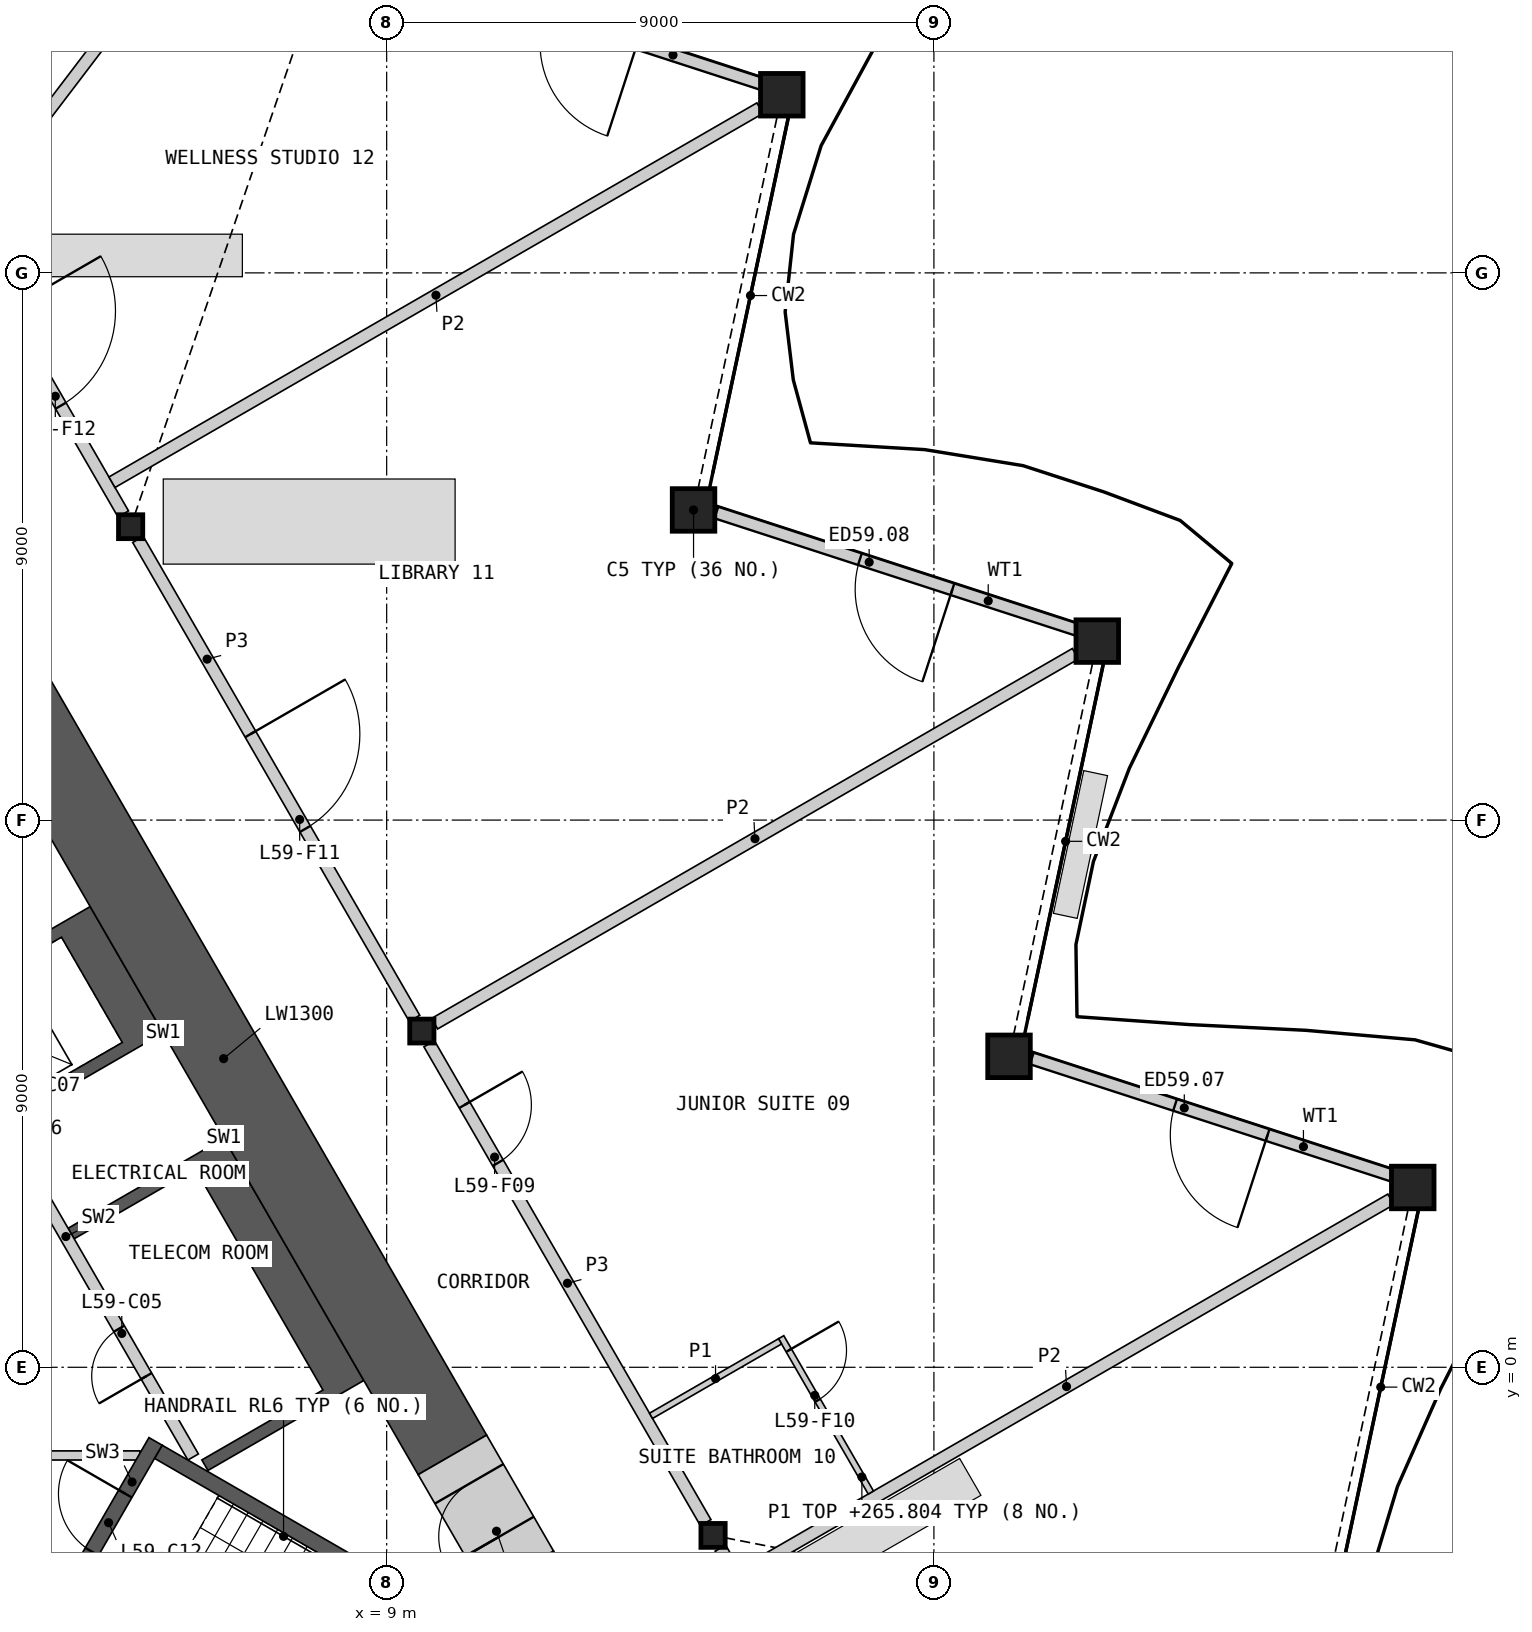
"""IFC4 building model, lengths in metres.
Left out: names, types, materials, properties, quantities, classifications, styles, units other than length and angle.
Written with IfcOpenShell. Run it as: python <this file> out.ifc"""

import sys

from ifc_helpers import new_model, si_unit, direction, frame, frame_2d, origin, origin_2d, place, context, subcontext, project, spatial, polyline, rectangle, hollow_rectangle, i_section, outline, extrude, element, fill, save


model = new_model("IFC4")
c1 = context("Model", 3, precision=1e-05, world=origin(), true_north=direction((0.0, 1.0)))
c2 = subcontext(c1, "Body", "Model", "MODEL_VIEW")
j1 = project(units=[si_unit("LENGTHUNIT", "METRE"), si_unit("PLANEANGLEUNIT", "RADIAN")], contexts=[c1])
p1 = place(None, origin())
s1 = spatial("IfcSite", under=j1, at=p1, CompositionType="ELEMENT")
p2 = place(p1, origin())
s2 = spatial("IfcBuilding", under=s1, at=p2, CompositionType="ELEMENT")
p3 = place(p2, frame((0.0, 0.0, 263.4)))
s3 = spatial("IfcBuildingStorey", under=s2, at=p3, CompositionType="ELEMENT", Elevation=263.4)
for number, where, z_axis, x_axis in (
    (1, (25.875, 2.957, 0.0), (0.0, 0.0, 1.0), (1.0, 0.0, 0.0)),
    (2, (19.235, 5.115, 0.0), (0.0, 0.0, 1.0), (1.0, 0.0, 0.0)),
    (3, (20.687, 11.943, 0.0), (0.0, 0.0, 1.0), (1.0, 0.0, 0.0)),
    (4, (14.047, 14.101, 0.0), (0.0, 0.0, 1.0), (1.0, 0.0, 0.0)),
    (5, (15.499, 20.93, 0.0), (0.0, 0.0, 1.0), (1.0, 0.0, 0.0)),
):
    element("IfcColumn", number, at=place(p3, frame(where, z_axis=z_axis, x_axis=x_axis)), inside=s3, PredefinedType="COLUMN", context=c2, shape_type="SweptSolid", body=[
        extrude(hollow_rectangle(XDim=0.7, YDim=0.7, WallThickness=0.045, at=origin_2d()), origin(), (0.0, 0.0, 1.0), 3.6),
    ])
for number, where, z_axis, x_axis in (
    (6, (14.368, -2.765, 0.0), (0.0, 0.0, 1.0), (1.0, 0.0, 0.0)),
    (7, (9.578, 5.53, 0.0), (0.0, 0.0, 1.0), (1.0, 0.0, 0.0)),
    (8, (4.789, 13.825, 0.0), (0.0, 0.0, 1.0), (1.0, 0.0, 0.0)),
):
    element("IfcColumn", number, at=place(p3, frame(where, z_axis=z_axis, x_axis=x_axis)), inside=s3, PredefinedType="COLUMN", context=c2, shape_type="SweptSolid", body=[
        extrude(i_section(OverallWidth=0.399, OverallDepth=0.393, WebThickness=0.023, FlangeThickness=0.037, at=origin_2d()), origin(), (0.0, 0.0, 1.0), 3.6),
    ])
p4 = place(p3, frame((25.566, 3.145, 0.0), z_axis=(0.0, 0.0, 1.0), x_axis=(-0.951057270474, 0.309014673241, 0.0)))
e9 = element("IfcWall", 9, at=p4, inside=s3, PredefinedType="SOLIDWALL", context=c2, shape_type="SweptSolid", body=[
    extrude(rectangle(XDim=6.263, YDim=0.2, at=frame_2d((3.131, 0.0))), origin(), (0.0, 0.0, 1.0), 2.701),
])
p5 = place(p4, frame((2.186, 0.0, 0.0)))
e10 = element("IfcOpeningElement", 10, at=p5, cuts=e9, PredefinedType="OPENING", context=c2, shape_type="SweptSolid", body=[
    extrude(rectangle(XDim=1.6, YDim=2.4, at=frame_2d((0.8, 1.2))), frame((0.0, 0.11, 0.0), z_axis=(0.0, -1.0, 0.0), x_axis=(1.0, 0.0, 0.0)), (0.0, 0.0, 1.0), 0.22),
])
p6 = place(p3, frame((20.384, 12.121, 0.0), z_axis=(0.0, 0.0, 1.0), x_axis=(-0.951051239427, 0.309033234433, 0.0)))
e11 = element("IfcWall", 11, at=p6, inside=s3, PredefinedType="SOLIDWALL", context=c2, shape_type="SweptSolid", body=[
    extrude(rectangle(XDim=6.269, YDim=0.2, at=frame_2d((3.134, 0.0))), origin(), (0.0, 0.0, 1.0), 2.701),
])
p7 = place(p6, frame((2.186, 0.0, 0.0)))
e12 = element("IfcOpeningElement", 12, at=p7, cuts=e11, PredefinedType="OPENING", context=c2, shape_type="SweptSolid", body=[
    extrude(rectangle(XDim=1.6, YDim=2.4, at=frame_2d((0.8, 1.2))), frame((0.0, 0.11, 0.0), z_axis=(0.0, -1.0, 0.0), x_axis=(1.0, 0.0, 0.0)), (0.0, 0.0, 1.0), 0.22),
])
p8 = place(p3, frame((15.201, 21.098, 0.0), z_axis=(0.0, 0.0, 1.0), x_axis=(-0.95105665506, 0.309016567299, 0.0)))
e13 = element("IfcWall", 13, at=p8, inside=s3, PredefinedType="SOLIDWALL", context=c2, shape_type="SweptSolid", body=[
    extrude(rectangle(XDim=6.275, YDim=0.2, at=frame_2d((3.137, 0.0))), origin(), (0.0, 0.0, 1.0), 2.701),
])
p9 = place(p8, frame((2.186, 0.0, 0.0)))
e14 = element("IfcOpeningElement", 14, at=p9, cuts=e13, PredefinedType="OPENING", context=c2, shape_type="SweptSolid", body=[
    extrude(rectangle(XDim=1.6, YDim=2.4, at=frame_2d((0.8, 1.2))), frame((0.0, 0.11, 0.0), z_axis=(0.0, -1.0, 0.0), x_axis=(1.0, 0.0, 0.0)), (0.0, 0.0, 1.0), 0.22),
])
p10 = place(p3, origin())
e15 = element("IfcWall", 15, at=p10, inside=s3, PredefinedType="SHEAR", context=c2, shape_type="SweptSolid", body=[
    extrude(outline(polyline([(6.324, 3.767), (8.624, -0.217), (8.231, -0.444), (6.061, -1.697), (5.96, -1.524), (7.952, -0.374), (5.852, 3.263), (3.861, 2.113), (3.76, 2.287), (5.931, 3.54), (6.324, 3.767)])), origin(), (0.0, 0.0, 1.0), 3.25),
])
p11 = place(p3, origin())
e16 = element("IfcWall", 16, at=p11, inside=s3, PredefinedType="SHEAR", context=c2, shape_type="SweptSolid", body=[
    extrude(outline(polyline([(5.324, 5.499), (4.931, 5.272), (2.76, 4.019), (2.66, 4.192), (4.652, 5.342), (3.652, 7.074), (1.66, 5.924), (1.561, 6.097), (3.731, 7.35), (4.124, 7.577), (5.324, 5.499)])), origin(), (0.0, 0.0, 1.0), 3.25),
])
p12 = place(p3, frame((5.817, -1.476, 0.0), z_axis=(0.0, 0.0, 1.0), x_axis=(-0.500002616675, 0.866023893041, 0.0)))
e17 = element("IfcWall", 17, at=p12, inside=s3, PredefinedType="SOLIDWALL", context=c2, shape_type="SweptSolid", body=[
    extrude(rectangle(XDim=8.373, YDim=0.2, at=frame_2d((4.187, 0.0))), origin(), (0.0, 0.0, 1.0), 3.25),
])
p13 = place(p12, frame((1.537, 0.0, 0.0)))
e18 = element("IfcOpeningElement", 18, at=p13, cuts=e17, PredefinedType="OPENING", context=c2, shape_type="SweptSolid", body=[
    extrude(rectangle(XDim=0.9, YDim=2.1, at=frame_2d((0.45, 1.05))), frame((0.0, 0.11, 0.0), z_axis=(0.0, -1.0, 0.0), x_axis=(1.0, 0.0, 0.0)), (0.0, 0.0, 1.0), 0.22),
])
p14 = place(p12, frame((4.837, 0.0, 0.0)))
e19 = element("IfcOpeningElement", 19, at=p14, cuts=e17, PredefinedType="OPENING", context=c2, shape_type="SweptSolid", body=[
    extrude(rectangle(XDim=0.9, YDim=2.1, at=frame_2d((0.45, 1.05))), frame((0.0, 0.11, 0.0), z_axis=(0.0, -1.0, 0.0), x_axis=(1.0, 0.0, 0.0)), (0.0, 0.0, 1.0), 0.22),
])
p15 = place(p12, frame((6.937, 0.0, 0.0)))
e20 = element("IfcOpeningElement", 20, at=p15, cuts=e17, PredefinedType="OPENING", context=c2, shape_type="SweptSolid", body=[
    extrude(rectangle(XDim=1.1, YDim=2.1, at=frame_2d((0.55, 1.05))), frame((0.0, 0.11, 0.0), z_axis=(0.0, -1.0, 0.0), x_axis=(1.0, 0.0, 0.0)), (0.0, 0.0, 1.0), 0.22),
])
p16 = place(p3, frame((-4.941, -1.45, 0.0), z_axis=(0.0, 0.0, 1.0), x_axis=(1.0, 0.0, 0.0)))
e21 = element("IfcWall", 21, at=p16, inside=s3, PredefinedType="PARTITIONING", context=c2, shape_type="SweptSolid", body=[
    extrude(rectangle(XDim=9.882, YDim=0.15, at=frame_2d((4.941, 0.0))), origin(), (0.0, 0.0, 1.0), 3.25),
])
p17 = place(p16, frame((4.391, 0.0, 0.0)))
e22 = element("IfcOpeningElement", 22, at=p17, cuts=e21, PredefinedType="OPENING", context=c2, shape_type="SweptSolid", body=[
    extrude(rectangle(XDim=1.1, YDim=2.1, at=frame_2d((0.55, 1.05))), frame((0.0, 0.085, 0.0), z_axis=(0.0, -1.0, 0.0), x_axis=(1.0, 0.0, 0.0)), (0.0, 0.0, 1.0), 0.17),
])
p18 = place(p3, origin())
e23 = element("IfcWall", 23, at=p18, inside=s3, PredefinedType="SHEAR", context=c2, shape_type="SweptSolid", body=[
    extrude(outline(polyline([(10.032, -4.298), (10.374, -4.206), (5.307, -1.281), (5.182, -1.498), (10.032, -4.298)])), origin(), (0.0, 0.0, 1.0), 3.25),
])
p19 = place(p3, frame((3.655, -3.893, 0.0), z_axis=(0.0, 0.0, 1.0), x_axis=(0.499982516597, 0.866035497597, 0.0)))
e24 = element("IfcWall", 24, at=p19, inside=s3, PredefinedType="SHEAR", context=c2, shape_type="SweptSolid", body=[
    extrude(rectangle(XDim=3.088, YDim=0.25, at=frame_2d((1.544, 0.0))), origin(), (0.0, 0.0, 1.0), 3.25),
])
p20 = place(p19, frame((0.994, 0.0, 0.0)))
e25 = element("IfcOpeningElement", 25, at=p20, cuts=e24, PredefinedType="OPENING", context=c2, shape_type="SweptSolid", body=[
    extrude(rectangle(XDim=1.1, YDim=2.1, at=frame_2d((0.55, 1.05))), frame((0.0, 0.135, 0.0), z_axis=(0.0, -1.0, 0.0), x_axis=(1.0, 0.0, 0.0)), (0.0, 0.0, 1.0), 0.27),
])
p21 = place(p3, frame((10.081, -1.441, 0.0), z_axis=(0.0, 0.0, 1.0), x_axis=(-0.500012180433, 0.866018371294, 0.0)))
e26 = element("IfcWall", 26, at=p21, inside=s3, PredefinedType="SHEAR", context=c2, shape_type="SweptSolid", body=[
    extrude(rectangle(XDim=15.05, YDim=1.3, at=frame_2d((7.525, 0.0))), origin(), (0.0, 0.0, 1.0), 3.25),
])
p22 = place(p3, frame((13.311, -7.035, 0.0), z_axis=(0.0, 0.0, 1.0), x_axis=(-0.500003555838, 0.866023350811, 0.0)))
e27 = element("IfcWall", 27, at=p22, inside=s3, PredefinedType="SHEAR", context=c2, shape_type="SweptSolid", body=[
    extrude(rectangle(XDim=4.26, YDim=1.3, at=frame_2d((2.13, 0.0))), origin(), (0.0, 0.0, 1.0), 3.25),
])
p23 = place(p3, frame((11.181, -3.346, 0.0), z_axis=(0.0, 0.0, 1.0), x_axis=(-0.499946605688, 0.86605622881, 0.0)))
e28 = element("IfcWall", 28, at=p23, inside=s3, PredefinedType="SHEAR", context=c2, shape_type="SweptSolid", body=[
    extrude(rectangle(XDim=2.2, YDim=1.3, at=frame_2d((1.1, 0.0))), origin(), (0.0, 0.0, 1.0), 3.25),
])
p24 = place(p23, frame((0.65, 0.0, 0.0)))
e29 = element("IfcOpeningElement", 29, at=p24, cuts=e28, PredefinedType="OPENING", context=c2, shape_type="SweptSolid", body=[
    extrude(rectangle(XDim=1.0, YDim=2.1, at=frame_2d((0.5, 1.05))), frame((0.0, 0.66, 0.0), z_axis=(0.0, -1.0, 0.0), x_axis=(1.0, 0.0, 0.0)), (0.0, 0.0, 1.0), 1.32),
])
p25 = place(p3, frame((9.699, 5.321, 0.0), z_axis=(0.0, 0.0, 1.0), x_axis=(0.49998193945, -0.866035830797, 0.0)))
e30 = element("IfcWall", 30, at=p25, inside=s3, PredefinedType="PARTITIONING", context=c2, shape_type="SweptSolid", body=[
    extrude(rectangle(XDim=9.094, YDim=0.2, at=frame_2d((4.547, 0.0))), origin(), (0.0, 0.0, 1.0), 3.25),
])
p26 = place(p25, frame((1.162, 0.0, 0.0)))
e31 = element("IfcOpeningElement", 31, at=p26, cuts=e30, PredefinedType="OPENING", context=c2, shape_type="SweptSolid", body=[
    extrude(rectangle(XDim=1.1, YDim=2.1, at=frame_2d((0.55, 1.05))), frame((0.0, 0.11, 0.0), z_axis=(0.0, -1.0, 0.0), x_axis=(1.0, 0.0, 0.0)), (0.0, 0.0, 1.0), 0.22),
])
p27 = place(p3, frame((4.91, 13.616, 0.0), z_axis=(0.0, 0.0, 1.0), x_axis=(0.50000207303, -0.866024206917, 0.0)))
e32 = element("IfcWall", 32, at=p27, inside=s3, PredefinedType="PARTITIONING", context=c2, shape_type="SweptSolid", body=[
    extrude(rectangle(XDim=9.095, YDim=0.2, at=frame_2d((4.547, 0.0))), origin(), (0.0, 0.0, 1.0), 3.25),
])
p28 = place(p27, frame((3.698, 0.0, 0.0)))
e33 = element("IfcOpeningElement", 33, at=p28, cuts=e32, PredefinedType="OPENING", context=c2, shape_type="SweptSolid", body=[
    extrude(rectangle(XDim=1.8, YDim=2.1, at=frame_2d((0.9, 1.05))), frame((0.0, 0.11, 0.0), z_axis=(0.0, -1.0, 0.0), x_axis=(1.0, 0.0, 0.0)), (0.0, 0.0, 1.0), 0.22),
])
p29 = place(p3, frame((1.913, 18.807, 0.0), z_axis=(0.0, 0.0, 1.0), x_axis=(0.499984524817, -0.866034338201, 0.0)))
e34 = element("IfcWall", 34, at=p29, inside=s3, PredefinedType="PARTITIONING", context=c2, shape_type="SweptSolid", body=[
    extrude(rectangle(XDim=5.51, YDim=0.2, at=frame_2d((2.755, 0.0))), origin(), (0.0, 0.0, 1.0), 3.25),
])
p30 = place(p29, frame((1.655, 0.0, 0.0)))
e35 = element("IfcOpeningElement", 35, at=p30, cuts=e34, PredefinedType="OPENING", context=c2, shape_type="SweptSolid", body=[
    extrude(rectangle(XDim=1.8, YDim=2.1, at=frame_2d((0.9, 1.05))), frame((0.0, 0.11, 0.0), z_axis=(0.0, -1.0, 0.0), x_axis=(1.0, 0.0, 0.0)), (0.0, 0.0, 1.0), 0.22),
])
p31 = place(p3, frame((14.489, -2.975, 0.0), z_axis=(0.0, 0.0, 1.0), x_axis=(0.500017753321, -0.866015153657, 0.0)))
e36 = element("IfcWall", 36, at=p31, inside=s3, PredefinedType="PARTITIONING", context=c2, shape_type="SweptSolid", body=[
    extrude(rectangle(XDim=5.51, YDim=0.2, at=frame_2d((2.755, 0.0))), origin(), (0.0, 0.0, 1.0), 3.25),
])
p32 = place(p31, frame((2.056, 0.0, 0.0)))
e37 = element("IfcOpeningElement", 37, at=p32, cuts=e36, PredefinedType="OPENING", context=c2, shape_type="SweptSolid", body=[
    extrude(rectangle(XDim=1.8, YDim=2.1, at=frame_2d((0.9, 1.05))), frame((0.0, 0.11, 0.0), z_axis=(0.0, -1.0, 0.0), x_axis=(1.0, 0.0, 0.0)), (0.0, 0.0, 1.0), 0.22),
])
p33 = place(p3, frame((2.024, 18.8, 0.0), z_axis=(0.0, 0.0, 1.0), x_axis=(0.605225740135, 0.796053894832, 0.0)))
e38 = element("IfcWall", 38, at=p33, inside=s3, PredefinedType="PARTITIONING", context=c2, shape_type="SweptSolid", body=[
    extrude(rectangle(XDim=13.511, YDim=0.2, at=frame_2d((6.756, 0.0))), origin(), (0.0, 0.0, 1.0), 2.404),
])
p34 = place(p3, frame((14.848, -3.396, 0.0), z_axis=(0.0, 0.0, 1.0), x_axis=(0.866026822589, 0.49999754255, 0.0)))
e39 = element("IfcWall", 39, at=p34, inside=s3, PredefinedType="PARTITIONING", context=c2, shape_type="SweptSolid", body=[
    extrude(rectangle(XDim=12.317, YDim=0.2, at=frame_2d((6.159, 0.0))), origin(), (0.0, 0.0, 1.0), 2.404),
])
p35 = place(p3, frame((4.482, 14.557, 0.0), z_axis=(0.0, 0.0, 1.0), x_axis=(0.866030620616, 0.499990964073, 0.0)))
e40 = element("IfcWall", 40, at=p35, inside=s3, PredefinedType="PARTITIONING", context=c2, shape_type="SweptSolid", body=[
    extrude(rectangle(XDim=12.304, YDim=0.2, at=frame_2d((6.152, 0.0))), origin(), (0.0, 0.0, 1.0), 2.404),
])
p36 = place(p3, frame((9.788, 5.651, 0.0), z_axis=(0.0, 0.0, 1.0), x_axis=(0.866024549986, 0.50000147882, 0.0)))
e41 = element("IfcWall", 41, at=p36, inside=s3, PredefinedType="PARTITIONING", context=c2, shape_type="SweptSolid", body=[
    extrude(rectangle(XDim=12.169, YDim=0.2, at=frame_2d((6.084, 0.0))), origin(), (0.0, 0.0, 1.0), 2.404),
])
p37 = place(p3, frame((15.488, 0.495, 0.0), z_axis=(0.0, 0.0, 1.0), x_axis=(0.500037662692, -0.866003658127, 0.0)))
e42 = element("IfcWall", 42, at=p37, inside=s3, PredefinedType="PARTITIONING", context=c2, shape_type="SweptSolid", body=[
    extrude(rectangle(XDim=2.95, YDim=0.1, at=frame_2d((1.475, 0.0))), origin(), (0.0, 0.0, 1.0), 2.404),
])
p38 = place(p37, frame((0.25, 0.0, 0.0)))
e43 = element("IfcOpeningElement", 43, at=p38, cuts=e42, PredefinedType="OPENING", context=c2, shape_type="SweptSolid", body=[
    extrude(rectangle(XDim=0.95, YDim=2.1, at=frame_2d((0.475, 1.05))), frame((0.0, 0.06, 0.0), z_axis=(0.0, -1.0, 0.0), x_axis=(1.0, 0.0, 0.0)), (0.0, 0.0, 1.0), 0.12),
])
p39 = place(p3, frame((13.348, -0.799, 0.0), z_axis=(0.0, 0.0, 1.0), x_axis=(0.866014668023, 0.500018594424, 0.0)))
e44 = element("IfcWall", 44, at=p39, inside=s3, PredefinedType="PARTITIONING", context=c2, shape_type="SweptSolid", body=[
    extrude(rectangle(XDim=2.45, YDim=0.1, at=frame_2d((1.225, 0.0))), origin(), (0.0, 0.0, 1.0), 2.404),
])
p40 = place(p5, origin())
e45 = element("IfcDoor", 45, at=p40, inside=s3, OperationType="DOUBLE_DOOR_SINGLE_SWING", PredefinedType="DOOR", context=c2, shape_type="SweptSolid", body=[
    extrude(rectangle(XDim=1.6, YDim=2.4, at=frame_2d((0.8, 1.2))), frame((0.0, 0.025, 0.0), z_axis=(0.0, -1.0, 0.0), x_axis=(1.0, 0.0, 0.0)), (0.0, 0.0, 1.0), 0.05),
])
fill(e10, e45)
p41 = place(p7, origin())
e46 = element("IfcDoor", 46, at=p41, inside=s3, OperationType="DOUBLE_DOOR_SINGLE_SWING", PredefinedType="DOOR", context=c2, shape_type="SweptSolid", body=[
    extrude(rectangle(XDim=1.6, YDim=2.4, at=frame_2d((0.8, 1.2))), frame((0.0, 0.025, 0.0), z_axis=(0.0, -1.0, 0.0), x_axis=(1.0, 0.0, 0.0)), (0.0, 0.0, 1.0), 0.05),
])
fill(e12, e46)
p42 = place(p13, origin())
e47 = element("IfcDoor", 47, at=p42, inside=s3, OperationType="SINGLE_SWING_LEFT", PredefinedType="DOOR", context=c2, shape_type="SweptSolid", body=[
    extrude(rectangle(XDim=0.9, YDim=2.1, at=frame_2d((0.45, 1.05))), frame((0.0, 0.025, 0.0), z_axis=(0.0, -1.0, 0.0), x_axis=(1.0, 0.0, 0.0)), (0.0, 0.0, 1.0), 0.05),
])
fill(e18, e47)
p43 = place(p20, origin())
e48 = element("IfcDoor", 48, at=p43, inside=s3, OperationType="SINGLE_SWING_RIGHT", PredefinedType="DOOR", context=c2, shape_type="SweptSolid", body=[
    extrude(rectangle(XDim=1.1, YDim=2.1, at=frame_2d((0.55, 1.05))), frame((0.0, 0.025, 0.0), z_axis=(0.0, -1.0, 0.0), x_axis=(1.0, 0.0, 0.0)), (0.0, 0.0, 1.0), 0.05),
])
fill(e25, e48)
p44 = place(p24, origin())
e49 = element("IfcDoor", 49, at=p44, inside=s3, OperationType="SINGLE_SWING_LEFT", PredefinedType="DOOR", context=c2, shape_type="SweptSolid", body=[
    extrude(rectangle(XDim=1.0, YDim=2.1, at=frame_2d((0.5, 1.05))), frame((0.0, 0.405, 0.0), z_axis=(0.0, -1.0, 0.0), x_axis=(1.0, 0.0, 0.0)), (0.0, 0.0, 1.0), 0.05),
])
fill(e29, e49)
p45 = place(p26, origin())
e50 = element("IfcDoor", 50, at=p45, inside=s3, OperationType="SINGLE_SWING_LEFT", PredefinedType="DOOR", context=c2, shape_type="SweptSolid", body=[
    extrude(rectangle(XDim=1.1, YDim=2.1, at=frame_2d((0.55, 1.05))), frame((0.0, 0.025, 0.0), z_axis=(0.0, -1.0, 0.0), x_axis=(1.0, 0.0, 0.0)), (0.0, 0.0, 1.0), 0.05),
])
fill(e31, e50)
p46 = place(p38, origin())
e51 = element("IfcDoor", 51, at=p46, inside=s3, OperationType="SINGLE_SWING_LEFT", PredefinedType="DOOR", context=c2, shape_type="SweptSolid", body=[
    extrude(rectangle(XDim=0.95, YDim=2.1, at=frame_2d((0.475, 1.05))), frame((0.0, 0.025, 0.0), z_axis=(0.0, -1.0, 0.0), x_axis=(1.0, 0.0, 0.0)), (0.0, 0.0, 1.0), 0.05),
])
fill(e43, e51)
p47 = place(p28, origin())
e52 = element("IfcDoor", 52, at=p47, inside=s3, OperationType="DOUBLE_DOOR_SINGLE_SWING", PredefinedType="DOOR", context=c2, shape_type="SweptSolid", body=[
    extrude(rectangle(XDim=1.8, YDim=2.1, at=frame_2d((0.9, 1.05))), frame((0.0, 0.025, 0.0), z_axis=(0.0, -1.0, 0.0), x_axis=(1.0, 0.0, 0.0)), (0.0, 0.0, 1.0), 0.05),
])
fill(e33, e52)
p48 = place(p30, origin())
e53 = element("IfcDoor", 53, at=p48, inside=s3, OperationType="DOUBLE_DOOR_SINGLE_SWING", PredefinedType="DOOR", context=c2, shape_type="SweptSolid", body=[
    extrude(rectangle(XDim=1.8, YDim=2.1, at=frame_2d((0.9, 1.05))), frame((0.0, 0.025, 0.0), z_axis=(0.0, -1.0, 0.0), x_axis=(1.0, 0.0, 0.0)), (0.0, 0.0, 1.0), 0.05),
])
fill(e35, e53)
save(model, sys.argv[1])
